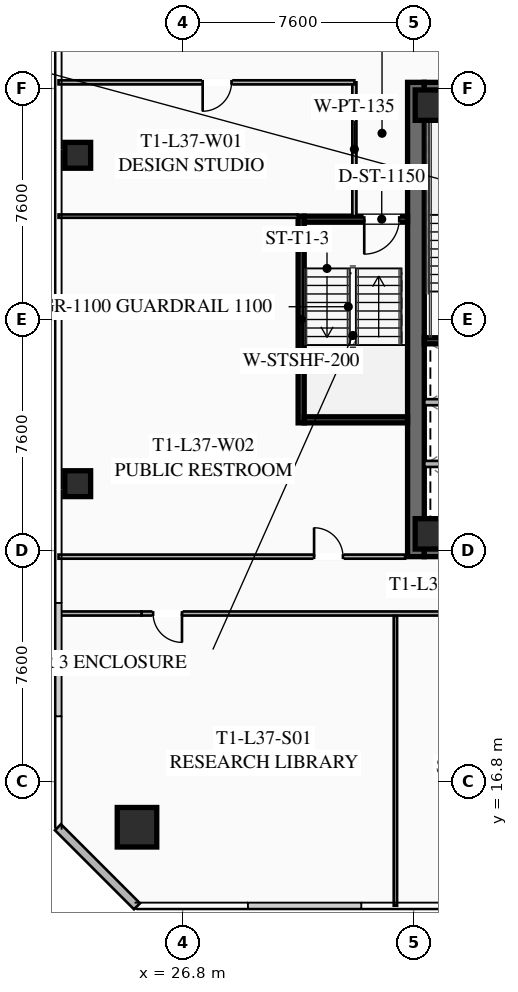
"""IFC4 building model, lengths in metres.
Left out: names, types, materials, properties, quantities, classifications, styles, units other than length and angle.
Written with IfcOpenShell. Run it as: python <this file> out.ifc"""

import sys

from ifc_helpers import new_model, si_unit, direction, frame, frame_2d, origin, origin_2d, place, context, subcontext, project, spatial, rectangle, hollow_rectangle, extrude, element, fill, save


model = new_model("IFC4")
c1 = context("Model", 3, precision=1e-05, world=origin(), true_north=direction((0.0, 1.0)))
c2 = subcontext(c1, "Body", "Model", "MODEL_VIEW")
j1 = project(units=[si_unit("LENGTHUNIT", "METRE"), si_unit("PLANEANGLEUNIT", "RADIAN")], contexts=[c1])
p1 = place(None, origin())
s1 = spatial("IfcSite", under=j1, at=p1, CompositionType="ELEMENT")
p2 = place(p1, origin())
s2 = spatial("IfcBuilding", under=s1, at=p2, CompositionType="ELEMENT")
p3 = place(p2, frame((0.0, 0.0, 139.25)))
s3 = spatial("IfcBuildingStorey", under=s2, at=p3, CompositionType="ELEMENT", Elevation=139.25)
p4 = place(p3, frame((34.475, 24.2, 0.0), z_axis=(0.0, 0.0, 1.0), x_axis=(0.0, 1.0, 0.0)))
e1 = element("IfcWall", 1, at=p4, inside=s3, PredefinedType="SHEAR", context=c2, shape_type="SweptSolid", body=[
    extrude(rectangle(XDim=15.6, YDim=0.55, at=frame_2d((7.8, 0.0))), origin(), (0.0, 0.0, 1.0), 3.55),
])
p5 = place(p3, frame((49.25, 24.475, 0.0), z_axis=(0.0, 0.0, 1.0), x_axis=(-1.0, 0.0, 0.0)))
e2 = element("IfcWall", 2, at=p5, inside=s3, PredefinedType="SHEAR", context=c2, shape_type="SweptSolid", body=[
    extrude(rectangle(XDim=14.5, YDim=0.55, at=frame_2d((7.25, 0.0))), origin(), (0.0, 0.0, 1.0), 3.55),
])
p6 = place(p5, frame((8.95, 0.0, 0.0)))
e3 = element("IfcOpeningElement", 3, at=p6, cuts=e2, PredefinedType="OPENING", context=c2, shape_type="SweptSolid", body=[
    extrude(rectangle(XDim=1.25, YDim=2.25, at=frame_2d((0.625, 1.125))), frame((0.0, 0.285, 0.0), z_axis=(0.0, -1.0, 0.0), x_axis=(1.0, 0.0, 0.0)), (0.0, 0.0, 1.0), 0.57),
])
p7 = place(p5, frame((3.9, 0.0, 0.0)))
e4 = element("IfcOpeningElement", 4, at=p7, cuts=e2, PredefinedType="OPENING", context=c2, shape_type="SweptSolid", body=[
    extrude(rectangle(XDim=1.25, YDim=2.25, at=frame_2d((0.625, 1.125))), frame((0.0, 0.285, 0.0), z_axis=(0.0, -1.0, 0.0), x_axis=(1.0, 0.0, 0.0)), (0.0, 0.0, 1.0), 0.57),
])
p8 = place(p3, frame((34.75, 39.525, 0.0), z_axis=(0.0, 0.0, 1.0), x_axis=(1.0, 0.0, 0.0)))
e5 = element("IfcWall", 5, at=p8, inside=s3, PredefinedType="SHEAR", context=c2, shape_type="SweptSolid", body=[
    extrude(rectangle(XDim=14.5, YDim=0.55, at=frame_2d((7.25, 0.0))), origin(), (0.0, 0.0, 1.0), 3.55),
])
p9 = place(p8, frame((4.3, 0.0, 0.0)))
e6 = element("IfcOpeningElement", 6, at=p9, cuts=e5, PredefinedType="OPENING", context=c2, shape_type="SweptSolid", body=[
    extrude(rectangle(XDim=1.25, YDim=2.25, at=frame_2d((0.625, 1.125))), frame((0.0, 0.285, 0.0), z_axis=(0.0, -1.0, 0.0), x_axis=(1.0, 0.0, 0.0)), (0.0, 0.0, 1.0), 0.57),
])
p10 = place(p8, frame((9.35, 0.0, 0.0)))
e7 = element("IfcOpeningElement", 7, at=p10, cuts=e5, PredefinedType="OPENING", context=c2, shape_type="SweptSolid", body=[
    extrude(rectangle(XDim=1.25, YDim=2.25, at=frame_2d((0.625, 1.125))), frame((0.0, 0.285, 0.0), z_axis=(0.0, -1.0, 0.0), x_axis=(1.0, 0.0, 0.0)), (0.0, 0.0, 1.0), 0.57),
])
for number, where, z_axis, x_axis in (
    (8, (34.95, 24.95, 0.0), (0.0, 0.0, 1.0), (1.0, 0.0, 0.0)),
    (9, (34.95, 39.05, 0.0), (0.0, 0.0, 1.0), (1.0, 0.0, 0.0)),
):
    element("IfcColumn", number, at=place(p3, frame(where, z_axis=z_axis, x_axis=x_axis)), inside=s3, PredefinedType="COLUMN", context=c2, shape_type="SweptSolid", body=[
        extrude(hollow_rectangle(XDim=1.0, YDim=1.0, WallThickness=0.04, at=origin_2d()), origin(), (0.0, 0.0, 1.0), 3.37),
    ])
p11 = place(p3, frame((25.3, 15.3, 0.0), z_axis=(0.0, 0.0, 1.0), x_axis=(1.0, 0.0, 0.0)))
e10 = element("IfcColumn", 10, at=p11, inside=s3, PredefinedType="COLUMN", context=c2, shape_type="SweptSolid", body=[
    extrude(hollow_rectangle(XDim=1.3, YDim=1.3, WallThickness=0.05, at=origin_2d()), origin(), (0.0, 0.0, 1.0), 3.37),
])
for number, where, z_axis, x_axis in (
    (11, (23.35, 37.4, 0.0), (0.0, 0.0, 1.0), (1.0, 0.0, 0.0)),
    (12, (23.35, 26.6, 0.0), (0.0, 0.0, 1.0), (1.0, 0.0, 0.0)),
):
    element("IfcColumn", number, at=place(p3, frame(where, z_axis=z_axis, x_axis=x_axis)), inside=s3, PredefinedType="COLUMN", context=c2, shape_type="SweptSolid", body=[
        extrude(hollow_rectangle(XDim=0.85, YDim=0.85, WallThickness=0.035, at=origin_2d()), origin(), (0.0, 0.0, 1.0), 3.37),
    ])
p12 = place(p3, frame((25.3, 12.7, 0.0), z_axis=(0.0, 0.0, 1.0), x_axis=(-0.707106781187, 0.707106781187, 0.0)))
e13 = element("IfcWall", 13, at=p12, inside=s3, PredefinedType="SOLIDWALL", context=c2, shape_type="SweptSolid", body=[
    extrude(rectangle(XDim=3.677, YDim=0.28, at=frame_2d((1.838, 0.0))), origin(), (0.0, 0.0, 1.0), 3.37),
])
for number, where, z_axis, x_axis in (
    (14, (34.75, 31.3, 0.0), (0.0, 0.0, 1.0), (1.0, 0.0, 0.0)),
    (15, (34.75, 38.7, 0.0), (0.0, 0.0, 1.0), (1.0, 0.0, 0.0)),
):
    element("IfcWall", number, at=place(p3, frame(where, z_axis=z_axis, x_axis=x_axis)), inside=s3, PredefinedType="SHEAR", context=c2, shape_type="SweptSolid", body=[
        extrude(rectangle(XDim=3.55, YDim=0.2, at=frame_2d((1.775, 0.0))), origin(), (0.0, 0.0, 1.0), 3.37),
    ])
for number, where, z_axis, x_axis in (
    (16, (34.75, 27.25, 0.0), (0.0, 0.0, 1.0), (1.0, 0.0, 0.0)),
    (17, (34.75, 29.28, 0.0), (0.0, 0.0, 1.0), (1.0, 0.0, 0.0)),
):
    element("IfcWall", number, at=place(p3, frame(where, z_axis=z_axis, x_axis=x_axis)), inside=s3, PredefinedType="SOLIDWALL", context=c2, shape_type="SweptSolid", body=[
        extrude(rectangle(XDim=3.2, YDim=0.2, at=frame_2d((1.6, 0.0))), origin(), (0.0, 0.0, 1.0), 3.37),
    ])
p13 = place(p3, frame((30.7, 28.6, 0.0), z_axis=(0.0, 0.0, 1.0), x_axis=(0.0, 1.0, 0.0)))
e18 = element("IfcWall", 18, at=p13, inside=s3, PredefinedType="SHEAR", context=c2, shape_type="SweptSolid", body=[
    extrude(rectangle(XDim=6.8, YDim=0.2, at=frame_2d((3.4, 0.0))), origin(), (0.0, 0.0, 1.0), 3.37),
])
p14 = place(p3, frame((34.2, 35.3, 0.0), z_axis=(0.0, 0.0, 1.0), x_axis=(-1.0, 0.0, 0.0)))
e19 = element("IfcWall", 19, at=p14, inside=s3, PredefinedType="SHEAR", context=c2, shape_type="SweptSolid", body=[
    extrude(rectangle(XDim=3.4, YDim=0.2, at=frame_2d((1.7, 0.0))), origin(), (0.0, 0.0, 1.0), 3.37),
])
p15 = place(p14, frame((0.275, 0.0, 0.0)))
e20 = element("IfcOpeningElement", 20, at=p15, cuts=e19, PredefinedType="OPENING", context=c2, shape_type="SweptSolid", body=[
    extrude(rectangle(XDim=1.15, YDim=2.2, at=frame_2d((0.575, 1.1))), frame((0.0, 0.11, 0.0), z_axis=(0.0, -1.0, 0.0), x_axis=(1.0, 0.0, 0.0)), (0.0, 0.0, 1.0), 0.22),
])
p16 = place(p3, frame((30.8, 28.7, 0.0), z_axis=(0.0, 0.0, 1.0), x_axis=(1.0, 0.0, 0.0)))
e21 = element("IfcWall", 21, at=p16, inside=s3, PredefinedType="SHEAR", context=c2, shape_type="SweptSolid", body=[
    extrude(rectangle(XDim=3.4, YDim=0.2, at=frame_2d((1.7, 0.0))), origin(), (0.0, 0.0, 1.0), 3.37),
])
p17 = place(p3, frame((32.45, 35.4, 0.0), z_axis=(0.0, 0.0, 1.0), x_axis=(0.0, 1.0, 0.0)))
e22 = element("IfcWall", 22, at=p17, inside=s3, PredefinedType="PARTITIONING", context=c2, shape_type="SweptSolid", body=[
    extrude(rectangle(XDim=4.4, YDim=0.135, at=frame_2d((2.2, 0.0))), origin(), (0.0, 0.0, 1.0), 2.723),
])
p18 = place(p3, frame((58.55, 22.33, 0.0), z_axis=(0.0, 0.0, 1.0), x_axis=(-1.0, 0.0, 0.0)))
e23 = element("IfcWall", 23, at=p18, inside=s3, PredefinedType="PARTITIONING", context=c2, shape_type="SweptSolid", body=[
    extrude(rectangle(XDim=33.1, YDim=0.135, at=frame_2d((16.55, 0.0))), origin(), (0.0, 0.0, 1.0), 2.723),
])
p19 = place(p18, frame((31.77, 0.0, 0.0)))
e24 = element("IfcOpeningElement", 24, at=p19, cuts=e23, PredefinedType="OPENING", context=c2, shape_type="SweptSolid", body=[
    extrude(rectangle(XDim=0.95, YDim=2.05, at=frame_2d((0.475, 1.025))), frame((0.0, 0.077, 0.0), z_axis=(0.0, -1.0, 0.0), x_axis=(1.0, 0.0, 0.0)), (0.0, 0.0, 1.0), 0.155),
])
p20 = place(p18, frame((15.868, 0.0, 0.0)))
e25 = element("IfcOpeningElement", 25, at=p20, cuts=e23, PredefinedType="OPENING", context=c2, shape_type="SweptSolid", body=[
    extrude(rectangle(XDim=0.95, YDim=2.05, at=frame_2d((0.475, 1.025))), frame((0.0, 0.077, 0.0), z_axis=(0.0, -1.0, 0.0), x_axis=(1.0, 0.0, 0.0)), (0.0, 0.0, 1.0), 0.155),
])
p21 = place(p18, frame((0.38, 0.0, 0.0)))
e26 = element("IfcOpeningElement", 26, at=p21, cuts=e23, PredefinedType="OPENING", context=c2, shape_type="SweptSolid", body=[
    extrude(rectangle(XDim=0.95, YDim=2.05, at=frame_2d((0.475, 1.025))), frame((0.0, 0.077, 0.0), z_axis=(0.0, -1.0, 0.0), x_axis=(1.0, 0.0, 0.0)), (0.0, 0.0, 1.0), 0.155),
])
p22 = place(p3, frame((22.72, 22.33, 0.0), z_axis=(0.0, 0.0, 1.0), x_axis=(1.0, 0.0, 0.0)))
e27 = element("IfcWall", 27, at=p22, inside=s3, PredefinedType="PARTITIONING", context=c2, shape_type="SweptSolid", body=[
    extrude(rectangle(XDim=2.73, YDim=0.135, at=frame_2d((1.365, 0.0))), origin(), (0.0, 0.0, 1.0), 2.723),
])
p23 = place(p3, frame((33.8, 12.72, 0.0), z_axis=(0.0, 0.0, 1.0), x_axis=(0.0, 1.0, 0.0)))
e28 = element("IfcWall", 28, at=p23, inside=s3, PredefinedType="PARTITIONING", context=c2, shape_type="SweptSolid", body=[
    extrude(rectangle(XDim=9.53, YDim=0.11, at=frame_2d((4.765, 0.0))), origin(), (0.0, 0.0, 1.0), 2.723),
])
p24 = place(p3, frame((32.45, 39.8, 0.0), z_axis=(0.0, 0.0, 1.0), x_axis=(-1.0, 0.0, 0.0)))
e29 = element("IfcWall", 29, at=p24, inside=s3, PredefinedType="PARTITIONING", context=c2, shape_type="SweptSolid", body=[
    extrude(rectangle(XDim=9.73, YDim=0.135, at=frame_2d((4.865, 0.0))), origin(), (0.0, 0.0, 1.0), 2.723),
])
p25 = place(p24, frame((4.04, 0.0, 0.0)))
e30 = element("IfcOpeningElement", 30, at=p25, cuts=e29, PredefinedType="OPENING", context=c2, shape_type="SweptSolid", body=[
    extrude(rectangle(XDim=0.95, YDim=2.05, at=frame_2d((0.475, 1.025))), frame((0.0, 0.077, 0.0), z_axis=(0.0, -1.0, 0.0), x_axis=(1.0, 0.0, 0.0)), (0.0, 0.0, 1.0), 0.155),
])
p26 = place(p3, frame((22.72, 24.2, 0.0), z_axis=(0.0, 0.0, 1.0), x_axis=(1.0, 0.0, 0.0)))
e31 = element("IfcWall", 31, at=p26, inside=s3, PredefinedType="PARTITIONING", context=c2, shape_type="SweptSolid", body=[
    extrude(rectangle(XDim=11.4, YDim=0.135, at=frame_2d((5.7, 0.0))), origin(), (0.0, 0.0, 1.0), 2.723),
])
p27 = place(p26, frame((8.405, 0.0, 0.0)))
e32 = element("IfcOpeningElement", 32, at=p27, cuts=e31, PredefinedType="OPENING", context=c2, shape_type="SweptSolid", body=[
    extrude(rectangle(XDim=0.95, YDim=2.05, at=frame_2d((0.475, 1.025))), frame((0.0, 0.077, 0.0), z_axis=(0.0, -1.0, 0.0), x_axis=(1.0, 0.0, 0.0)), (0.0, 0.0, 1.0), 0.155),
])
p28 = place(p3, frame((30.6, 35.4, 0.0), z_axis=(0.0, 0.0, 1.0), x_axis=(-1.0, 0.0, 0.0)))
e33 = element("IfcWall", 33, at=p28, inside=s3, PredefinedType="PARTITIONING", context=c2, shape_type="SweptSolid", body=[
    extrude(rectangle(XDim=7.88, YDim=0.11, at=frame_2d((3.94, 0.0))), origin(), (0.0, 0.0, 1.0), 2.723),
])
p29 = place(p15, origin())
e34 = element("IfcDoor", 34, at=p29, inside=s3, OperationType="SINGLE_SWING_RIGHT", PredefinedType="DOOR", context=c2, shape_type="SweptSolid", body=[
    extrude(rectangle(XDim=1.15, YDim=2.2, at=frame_2d((0.575, 1.1))), frame((0.0, 0.025, 0.0), z_axis=(0.0, -1.0, 0.0), x_axis=(1.0, 0.0, 0.0)), (0.0, 0.0, 1.0), 0.05),
])
fill(e20, e34)
p30 = place(p19, origin())
e35 = element("IfcDoor", 35, at=p30, inside=s3, OperationType="SINGLE_SWING_LEFT", PredefinedType="DOOR", context=c2, shape_type="SweptSolid", body=[
    extrude(rectangle(XDim=0.95, YDim=2.05, at=frame_2d((0.475, 1.025))), frame((0.0, 0.025, 0.0), z_axis=(0.0, -1.0, 0.0), x_axis=(1.0, 0.0, 0.0)), (0.0, 0.0, 1.0), 0.05),
])
fill(e24, e35)
p31 = place(p25, origin())
e36 = element("IfcDoor", 36, at=p31, inside=s3, OperationType="SINGLE_SWING_RIGHT", PredefinedType="DOOR", context=c2, shape_type="SweptSolid", body=[
    extrude(rectangle(XDim=0.95, YDim=2.05, at=frame_2d((0.475, 1.025))), frame((0.0, 0.025, 0.0), z_axis=(0.0, -1.0, 0.0), x_axis=(1.0, 0.0, 0.0)), (0.0, 0.0, 1.0), 0.05),
])
fill(e30, e36)
p32 = place(p27, origin())
e37 = element("IfcDoor", 37, at=p32, inside=s3, OperationType="SINGLE_SWING_LEFT", PredefinedType="DOOR", context=c2, shape_type="SweptSolid", body=[
    extrude(rectangle(XDim=0.95, YDim=2.05, at=frame_2d((0.475, 1.025))), frame((0.0, 0.025, 0.0), z_axis=(0.0, -1.0, 0.0), x_axis=(1.0, 0.0, 0.0)), (0.0, 0.0, 1.0), 0.05),
])
fill(e32, e37)
save(model, sys.argv[1])
